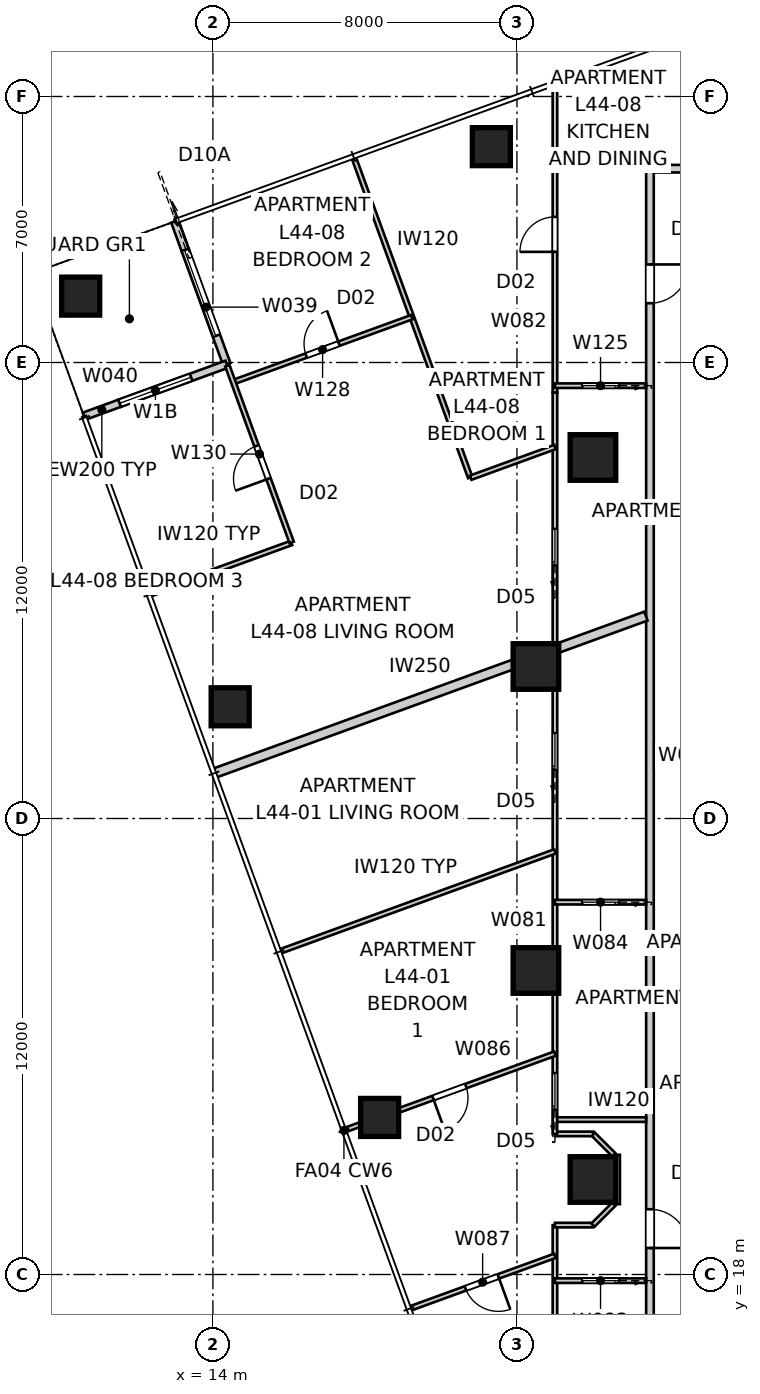
"""IFC4 building model, lengths in metres.
Left out: names, types, materials, properties, quantities, classifications, styles, units other than length and angle.
Written with IfcOpenShell. Run it as: python <this file> out.ifc"""

import sys

from ifc_helpers import new_model, si_unit, direction, frame, frame_2d, origin, origin_2d, place, context, subcontext, project, spatial, rectangle, extrude, element, fill, save


model = new_model("IFC4")
c1 = context("Model", 3, precision=1e-05, world=origin(), true_north=direction((0.0, 1.0)))
c2 = subcontext(c1, "Body", "Model", "MODEL_VIEW")
j1 = project(units=[si_unit("LENGTHUNIT", "METRE"), si_unit("PLANEANGLEUNIT", "RADIAN")], contexts=[c1])
p1 = place(None, origin())
s1 = spatial("IfcSite", under=j1, at=p1, CompositionType="ELEMENT")
p2 = place(p1, origin())
s2 = spatial("IfcBuilding", under=s1, at=p2, CompositionType="ELEMENT")
p3 = place(p2, frame((0.0, 0.0, 160.8)))
s3 = spatial("IfcBuildingStorey", under=s2, at=p3, CompositionType="ELEMENT", Elevation=160.8)
for number, where, z_axis, x_axis in (
    (1, (21.327, 47.68, 0.0), (0.0, 0.0, 1.0), (1.0, 0.0, 0.0)),
    (2, (10.521, 43.747, 0.0), (0.0, 0.0, 1.0), (1.0, 0.0, 0.0)),
    (3, (14.454, 32.94, 0.0), (0.0, 0.0, 1.0), (1.0, 0.0, 0.0)),
    (4, (18.387, 22.134, 0.0), (0.0, 0.0, 1.0), (1.0, 0.0, 0.0)),
):
    element("IfcColumn", number, at=place(p3, frame(where, z_axis=z_axis, x_axis=x_axis)), inside=s3, PredefinedType="COLUMN", context=c2, shape_type="SweptSolid", body=[
        extrude(rectangle(XDim=1.0, YDim=1.0, at=origin_2d()), origin(), (0.0, 0.0, 1.0), 3.4),
    ])
for number, where, z_axis, x_axis in (
    (5, (24.0, 39.5, 0.0), (0.0, 0.0, 1.0), (1.0, 0.0, 0.0)),
    (6, (22.5, 34.0, 0.0), (0.0, 0.0, 1.0), (1.0, 0.0, 0.0)),
    (7, (22.5, 26.0, 0.0), (0.0, 0.0, 1.0), (1.0, 0.0, 0.0)),
    (8, (24.0, 20.5, 0.0), (0.0, 0.0, 1.0), (1.0, 0.0, 0.0)),
):
    element("IfcColumn", number, at=place(p3, frame(where, z_axis=z_axis, x_axis=x_axis)), inside=s3, PredefinedType="COLUMN", context=c2, shape_type="SweptSolid", body=[
        extrude(rectangle(XDim=1.2, YDim=1.2, at=origin_2d()), origin(), (0.0, 0.0, 1.0), 3.4),
    ])
p4 = place(p3, frame((12.998, 45.712, 0.0), z_axis=(0.0, 0.0, 1.0), x_axis=(0.342110593602, -0.939659694648, 0.0)))
e9 = element("IfcWall", 9, at=p4, inside=s3, PredefinedType="SOLIDWALL", context=c2, shape_type="SweptSolid", body=[
    extrude(rectangle(XDim=0.8, YDim=0.2, at=frame_2d((0.4, 0.0))), origin(), (0.0, 0.0, 1.0), 3.25),
])
p5 = place(p3, frame((13.271, 44.96, 0.0), z_axis=(0.0, 0.0, 1.0), x_axis=(0.342018703306, -0.939693144909, 0.0)))
e10 = element("IfcWall", 10, at=p5, inside=s3, PredefinedType="SOLIDWALL", context=c2, shape_type="SweptSolid", body=[
    extrude(rectangle(XDim=3.2, YDim=0.2, at=frame_2d((1.6, 0.0))), origin(), (0.0, 0.0, 1.0), 2.722),
])
p6 = place(p5, origin())
e11 = element("IfcOpeningElement", 11, at=p6, cuts=e10, PredefinedType="OPENING", context=c2, shape_type="SweptSolid", body=[
    extrude(rectangle(XDim=2.4, YDim=2.1, at=frame_2d((1.2, 1.05))), frame((0.0, 0.11, 0.0), z_axis=(0.0, -1.0, 0.0), x_axis=(1.0, 0.0, 0.0)), (0.0, 0.0, 1.0), 0.22),
])
p7 = place(p3, frame((14.366, 41.953, 0.0), z_axis=(0.0, 0.0, 1.0), x_axis=(-0.939712609717, -0.341965219194, 0.0)))
e12 = element("IfcWall", 12, at=p7, inside=s3, PredefinedType="SOLIDWALL", context=c2, shape_type="SweptSolid", body=[
    extrude(rectangle(XDim=3.0, YDim=0.2, at=frame_2d((1.5, 0.0))), origin(), (0.0, 0.0, 1.0), 2.722),
])
p8 = place(p7, frame((1.0, 0.0, 0.45)))
e13 = element("IfcOpeningElement", 13, at=p8, cuts=e12, PredefinedType="OPENING", context=c2, shape_type="SweptSolid", body=[
    extrude(rectangle(XDim=2.0, YDim=1.8, at=frame_2d((1.0, 0.9))), frame((0.0, 0.11, 0.0), z_axis=(0.0, -1.0, 0.0), x_axis=(1.0, 0.0, 0.0)), (0.0, 0.0, 1.0), 0.22),
])
p9 = place(p3, frame((11.547, 40.927, 0.0), z_axis=(0.0, 0.0, 1.0), x_axis=(-0.939686455819, -0.342037080957, 0.0)))
e14 = element("IfcWall", 14, at=p9, inside=s3, PredefinedType="SOLIDWALL", context=c2, shape_type="SweptSolid", body=[
    extrude(rectangle(XDim=1.0, YDim=0.2, at=frame_2d((0.5, 0.0))), origin(), (0.0, 0.0, 1.0), 3.25),
])
p10 = place(p3, frame((33.098, 47.1, 0.0), z_axis=(0.0, 0.0, 1.0), x_axis=(-1.0, 0.0, 0.0)))
e15 = element("IfcWall", 15, at=p10, inside=s3, PredefinedType="PARTITIONING", context=c2, shape_type="SweptSolid", body=[
    extrude(rectangle(XDim=7.598, YDim=0.2, at=frame_2d((3.799, 0.0))), origin(), (0.0, 0.0, 1.0), 3.25),
])
p11 = place(p3, frame((25.5, 47.1, 0.0), z_axis=(0.0, 0.0, 1.0), x_axis=(0.0, -1.0, 0.0)))
e16 = element("IfcWall", 16, at=p11, inside=s3, PredefinedType="PARTITIONING", context=c2, shape_type="SweptSolid", body=[
    extrude(rectangle(XDim=33.4, YDim=0.2, at=frame_2d((16.7, 0.0))), origin(), (0.0, 0.0, 1.0), 3.25),
])
p12 = place(p11, frame((2.52, 0.0, 0.0)))
e17 = element("IfcOpeningElement", 17, at=p12, cuts=e16, PredefinedType="OPENING", context=c2, shape_type="SweptSolid", body=[
    extrude(rectangle(XDim=1.02, YDim=2.34, at=frame_2d((0.51, 1.17))), frame((0.0, 0.11, 0.0), z_axis=(0.0, -1.0, 0.0), x_axis=(1.0, 0.0, 0.0)), (0.0, 0.0, 1.0), 0.22),
])
p13 = place(p11, frame((27.383, 0.0, 0.0)))
e18 = element("IfcOpeningElement", 18, at=p13, cuts=e16, PredefinedType="OPENING", context=c2, shape_type="SweptSolid", body=[
    extrude(rectangle(XDim=1.02, YDim=2.1, at=frame_2d((0.51, 1.05))), frame((0.0, 0.11, 0.0), z_axis=(0.0, -1.0, 0.0), x_axis=(1.0, 0.0, 0.0)), (0.0, 0.0, 1.0), 0.22),
])
p14 = place(p3, frame((14.027, 31.188, 0.0), z_axis=(0.0, 0.0, 1.0), x_axis=(0.939693801585, 0.342016899091, 0.0)))
e19 = element("IfcWall", 19, at=p14, inside=s3, PredefinedType="PARTITIONING", context=c2, shape_type="SweptSolid", body=[
    extrude(rectangle(XDim=12.097, YDim=0.25, at=frame_2d((6.049, 0.0))), origin(), (0.0, 0.0, 1.0), 3.25),
])
p15 = place(p3, frame((23.0, 22.076, 0.0), z_axis=(0.0, 0.0, 1.0), x_axis=(1.0, 0.0, 0.0)))
e20 = element("IfcWall", 20, at=p15, inside=s3, PredefinedType="PARTITIONING", context=c2, shape_type="SweptSolid", body=[
    extrude(rectangle(XDim=2.4, YDim=0.12, at=frame_2d((1.2, 0.0))), origin(), (0.0, 0.0, 1.0), 3.25),
])
p16 = place(p3, frame((23.0, 11.2, 0.0), z_axis=(0.0, 0.0, 1.0), x_axis=(0.0, 1.0, 0.0)))
e21 = element("IfcWall", 21, at=p16, inside=s3, PredefinedType="PARTITIONING", context=c2, shape_type="SweptSolid", body=[
    extrude(rectangle(XDim=8.1, YDim=0.12, at=frame_2d((4.05, 0.0))), origin(), (0.0, 0.0, 1.0), 3.25),
])
p17 = place(p16, frame((3.849, 0.0, 0.0)))
e22 = element("IfcOpeningElement", 22, at=p17, cuts=e21, PredefinedType="OPENING", context=c2, shape_type="SweptSolid", body=[
    extrude(rectangle(XDim=0.96, YDim=2.1, at=frame_2d((0.48, 1.05))), frame((0.0, 0.07, 0.0), z_axis=(0.0, -1.0, 0.0), x_axis=(1.0, 0.0, 0.0)), (0.0, 0.0, 1.0), 0.14),
])
p18 = place(p3, frame((23.0, 19.3, 0.0), z_axis=(0.0, 0.0, 1.0), x_axis=(1.0, 0.0, 0.0)))
e23 = element("IfcWall", 23, at=p18, inside=s3, PredefinedType="PARTITIONING", context=c2, shape_type="SweptSolid", body=[
    extrude(rectangle(XDim=1.0, YDim=0.12, at=frame_2d((0.5, 0.0))), origin(), (0.0, 0.0, 1.0), 3.25),
])
p19 = place(p3, frame((24.0, 19.3, 0.0), z_axis=(0.0, 0.0, 1.0), x_axis=(0.707106781187, 0.707106781187, 0.0)))
e24 = element("IfcWall", 24, at=p19, inside=s3, PredefinedType="PARTITIONING", context=c2, shape_type="SweptSolid", body=[
    extrude(rectangle(XDim=0.778, YDim=0.12, at=frame_2d((0.389, 0.0))), origin(), (0.0, 0.0, 1.0), 3.25),
])
p20 = place(p3, frame((24.65, 19.85, 0.0), z_axis=(0.0, 0.0, 1.0), x_axis=(0.0, 1.0, 0.0)))
e25 = element("IfcWall", 25, at=p20, inside=s3, PredefinedType="PARTITIONING", context=c2, shape_type="SweptSolid", body=[
    extrude(rectangle(XDim=1.3, YDim=0.12, at=frame_2d((0.65, 0.0))), origin(), (0.0, 0.0, 1.0), 3.25),
])
p21 = place(p3, frame((24.55, 21.15, 0.0), z_axis=(0.0, 0.0, 1.0), x_axis=(-0.707106781187, 0.707106781187, 0.0)))
e26 = element("IfcWall", 26, at=p21, inside=s3, PredefinedType="PARTITIONING", context=c2, shape_type="SweptSolid", body=[
    extrude(rectangle(XDim=0.778, YDim=0.12, at=frame_2d((0.389, 0.0))), origin(), (0.0, 0.0, 1.0), 3.25),
])
p22 = place(p3, frame((24.0, 21.7, 0.0), z_axis=(0.0, 0.0, 1.0), x_axis=(-1.0, 0.0, 0.0)))
e27 = element("IfcWall", 27, at=p22, inside=s3, PredefinedType="PARTITIONING", context=c2, shape_type="SweptSolid", body=[
    extrude(rectangle(XDim=1.0, YDim=0.12, at=frame_2d((0.5, 0.0))), origin(), (0.0, 0.0, 1.0), 3.25),
])
p23 = place(p3, frame((23.0, 21.7, 0.0), z_axis=(0.0, 0.0, 1.0), x_axis=(0.0, 1.0, 0.0)))
e28 = element("IfcWall", 28, at=p23, inside=s3, PredefinedType="PARTITIONING", context=c2, shape_type="SweptSolid", body=[
    extrude(rectangle(XDim=19.512, YDim=0.12, at=frame_2d((9.756, 0.0))), origin(), (0.0, 0.0, 1.0), 2.55),
])
p24 = place(p23, frame((14.961, 0.0, 0.0)))
e29 = element("IfcOpeningElement", 29, at=p24, cuts=e28, PredefinedType="OPENING", context=c2, shape_type="SweptSolid", body=[
    extrude(rectangle(XDim=0.96, YDim=2.1, at=frame_2d((0.48, 1.05))), frame((0.0, 0.07, 0.0), z_axis=(0.0, -1.0, 0.0), x_axis=(1.0, 0.0, 0.0)), (0.0, 0.0, 1.0), 0.14),
])
p25 = place(p23, frame((0.641, 0.0, 0.0)))
e30 = element("IfcOpeningElement", 30, at=p25, cuts=e28, PredefinedType="OPENING", context=c2, shape_type="SweptSolid", body=[
    extrude(rectangle(XDim=0.96, YDim=2.1, at=frame_2d((0.48, 1.05))), frame((0.0, 0.07, 0.0), z_axis=(0.0, -1.0, 0.0), x_axis=(1.0, 0.0, 0.0)), (0.0, 0.0, 1.0), 0.14),
])
p26 = place(p23, frame((9.587, 0.0, 0.0)))
e31 = element("IfcOpeningElement", 31, at=p26, cuts=e28, PredefinedType="OPENING", context=c2, shape_type="SweptSolid", body=[
    extrude(rectangle(XDim=0.96, YDim=2.1, at=frame_2d((0.48, 1.05))), frame((0.0, 0.07, 0.0), z_axis=(0.0, -1.0, 0.0), x_axis=(1.0, 0.0, 0.0)), (0.0, 0.0, 1.0), 0.14),
])
p27 = place(p3, frame((25.4, 17.838, 0.0), z_axis=(0.0, 0.0, 1.0), x_axis=(-1.0, 0.0, 0.0)))
e32 = element("IfcWall", 32, at=p27, inside=s3, PredefinedType="PARTITIONING", context=c2, shape_type="SweptSolid", body=[
    extrude(rectangle(XDim=2.4, YDim=0.12, at=frame_2d((1.2, 0.0))), origin(), (0.0, 0.0, 1.0), 3.25),
])
p28 = place(p27, frame((0.72, 0.0, 0.0)))
e33 = element("IfcOpeningElement", 33, at=p28, cuts=e32, PredefinedType="OPENING", context=c2, shape_type="SweptSolid", body=[
    extrude(rectangle(XDim=0.96, YDim=2.1, at=frame_2d((0.48, 1.05))), frame((0.0, 0.07, 0.0), z_axis=(0.0, -1.0, 0.0), x_axis=(1.0, 0.0, 0.0)), (0.0, 0.0, 1.0), 0.14),
])
p29 = place(p3, frame((25.4, 27.798, 0.0), z_axis=(0.0, 0.0, 1.0), x_axis=(-1.0, 0.0, 0.0)))
e34 = element("IfcWall", 34, at=p29, inside=s3, PredefinedType="PARTITIONING", context=c2, shape_type="SweptSolid", body=[
    extrude(rectangle(XDim=2.4, YDim=0.12, at=frame_2d((1.2, 0.0))), origin(), (0.0, 0.0, 1.0), 3.25),
])
p30 = place(p29, frame((0.72, 0.0, 0.0)))
e35 = element("IfcOpeningElement", 35, at=p30, cuts=e34, PredefinedType="OPENING", context=c2, shape_type="SweptSolid", body=[
    extrude(rectangle(XDim=0.96, YDim=2.1, at=frame_2d((0.48, 1.05))), frame((0.0, 0.07, 0.0), z_axis=(0.0, -1.0, 0.0), x_axis=(1.0, 0.0, 0.0)), (0.0, 0.0, 1.0), 0.14),
])
p31 = place(p3, frame((23.0, 29.134, 0.0), z_axis=(0.0, 0.0, 1.0), x_axis=(-0.939685835373, -0.342038785519, 0.0)))
e36 = element("IfcWall", 36, at=p31, inside=s3, PredefinedType="PARTITIONING", context=c2, shape_type="SweptSolid", body=[
    extrude(rectangle(XDim=7.689, YDim=0.12, at=frame_2d((3.844, 0.0))), origin(), (0.0, 0.0, 1.0), 3.25),
])
p32 = place(p3, frame((23.0, 23.812, 0.0), z_axis=(0.0, 0.0, 1.0), x_axis=(-0.939693791822, -0.342016925912, 0.0)))
e37 = element("IfcWall", 37, at=p32, inside=s3, PredefinedType="PARTITIONING", context=c2, shape_type="SweptSolid", body=[
    extrude(rectangle(XDim=5.869, YDim=0.12, at=frame_2d((2.935, 0.0))), origin(), (0.0, 0.0, 1.0), 3.25),
])
p33 = place(p32, frame((2.494, 0.0, 0.0)))
e38 = element("IfcOpeningElement", 38, at=p33, cuts=e37, PredefinedType="OPENING", context=c2, shape_type="SweptSolid", body=[
    extrude(rectangle(XDim=0.92, YDim=2.34, at=frame_2d((0.46, 1.17))), frame((0.0, 0.07, 0.0), z_axis=(0.0, -1.0, 0.0), x_axis=(1.0, 0.0, 0.0)), (0.0, 0.0, 1.0), 0.14),
])
p34 = place(p3, frame((23.0, 18.492, 0.0), z_axis=(0.0, 0.0, 1.0), x_axis=(-0.939682468191, -0.342048036063, 0.0)))
e39 = element("IfcWall", 39, at=p34, inside=s3, PredefinedType="PARTITIONING", context=c2, shape_type="SweptSolid", body=[
    extrude(rectangle(XDim=4.049, YDim=0.12, at=frame_2d((2.024, 0.0))), origin(), (0.0, 0.0, 1.0), 3.25),
])
p35 = place(p34, frame((1.584, 0.0, 0.0)))
e40 = element("IfcOpeningElement", 40, at=p35, cuts=e39, PredefinedType="OPENING", context=c2, shape_type="SweptSolid", body=[
    extrude(rectangle(XDim=0.92, YDim=2.34, at=frame_2d((0.46, 1.17))), frame((0.0, 0.07, 0.0), z_axis=(0.0, -1.0, 0.0), x_axis=(1.0, 0.0, 0.0)), (0.0, 0.0, 1.0), 0.14),
])
p36 = place(p3, frame((25.4, 41.39, 0.0), z_axis=(0.0, 0.0, 1.0), x_axis=(-1.0, 0.0, 0.0)))
e41 = element("IfcWall", 41, at=p36, inside=s3, PredefinedType="PARTITIONING", context=c2, shape_type="SweptSolid", body=[
    extrude(rectangle(XDim=2.4, YDim=0.12, at=frame_2d((1.2, 0.0))), origin(), (0.0, 0.0, 1.0), 3.25),
])
p37 = place(p36, frame((0.72, 0.0, 0.0)))
e42 = element("IfcOpeningElement", 42, at=p37, cuts=e41, PredefinedType="OPENING", context=c2, shape_type="SweptSolid", body=[
    extrude(rectangle(XDim=0.96, YDim=2.1, at=frame_2d((0.48, 1.05))), frame((0.0, 0.07, 0.0), z_axis=(0.0, -1.0, 0.0), x_axis=(1.0, 0.0, 0.0)), (0.0, 0.0, 1.0), 0.14),
])
p38 = place(p3, frame((17.71, 47.385, 0.0), z_axis=(0.0, 0.0, 1.0), x_axis=(0.342034340019, -0.939687453491, 0.0)))
e43 = element("IfcWall", 43, at=p38, inside=s3, PredefinedType="PARTITIONING", context=c2, shape_type="SweptSolid", body=[
    extrude(rectangle(XDim=8.95, YDim=0.12, at=frame_2d((4.475, 0.0))), origin(), (0.0, 0.0, 1.0), 3.25),
])
p39 = place(p3, frame((20.784, 38.969, 0.0), z_axis=(0.0, 0.0, 1.0), x_axis=(0.939696672396, 0.342009011412, 0.0)))
e44 = element("IfcWall", 44, at=p39, inside=s3, PredefinedType="PARTITIONING", context=c2, shape_type="SweptSolid", body=[
    extrude(rectangle(XDim=2.359, YDim=0.12, at=frame_2d((1.179, 0.0))), origin(), (0.0, 0.0, 1.0), 3.25),
])
p40 = place(p3, frame((14.537, 41.484, 0.0), z_axis=(0.0, 0.0, 1.0), x_axis=(0.939696437289, 0.342009657388, 0.0)))
e45 = element("IfcWall", 45, at=p40, inside=s3, PredefinedType="PARTITIONING", context=c2, shape_type="SweptSolid", body=[
    extrude(rectangle(XDim=5.0, YDim=0.12, at=frame_2d((2.5, 0.0))), origin(), (0.0, 0.0, 1.0), 3.25),
])
p41 = place(p40, frame((2.04, 0.0, 0.0)))
e46 = element("IfcOpeningElement", 46, at=p41, cuts=e45, PredefinedType="OPENING", context=c2, shape_type="SweptSolid", body=[
    extrude(rectangle(XDim=0.92, YDim=2.34, at=frame_2d((0.46, 1.17))), frame((0.0, 0.07, 0.0), z_axis=(0.0, -1.0, 0.0), x_axis=(1.0, 0.0, 0.0)), (0.0, 0.0, 1.0), 0.14),
])
p42 = place(p3, frame((12.355, 35.901, 0.0), z_axis=(0.0, 0.0, 1.0), x_axis=(0.939701350773, 0.341996156931, 0.0)))
e47 = element("IfcWall", 47, at=p42, inside=s3, PredefinedType="PARTITIONING", context=c2, shape_type="SweptSolid", body=[
    extrude(rectangle(XDim=3.95, YDim=0.12, at=frame_2d((1.975, 0.0))), origin(), (0.0, 0.0, 1.0), 3.25),
])
p43 = place(p3, frame((16.073, 37.264, 0.0), z_axis=(0.0, 0.0, 1.0), x_axis=(-0.34204797738, 0.939682489552, 0.0)))
e48 = element("IfcWall", 48, at=p43, inside=s3, PredefinedType="PARTITIONING", context=c2, shape_type="SweptSolid", body=[
    extrude(rectangle(XDim=4.95, YDim=0.12, at=frame_2d((2.475, 0.0))), origin(), (0.0, 0.0, 1.0), 3.25),
])
p44 = place(p43, frame((1.785, 0.0, 0.0)))
e49 = element("IfcOpeningElement", 49, at=p44, cuts=e48, PredefinedType="OPENING", context=c2, shape_type="SweptSolid", body=[
    extrude(rectangle(XDim=0.92, YDim=2.34, at=frame_2d((0.46, 1.17))), frame((0.0, 0.07, 0.0), z_axis=(0.0, -1.0, 0.0), x_axis=(1.0, 0.0, 0.0)), (0.0, 0.0, 1.0), 0.14),
])
p45 = place(p3, frame((23.0, 41.212, 0.0), z_axis=(0.0, 0.0, 1.0), x_axis=(0.0, 1.0, 0.0)))
e50 = element("IfcWall", 50, at=p45, inside=s3, PredefinedType="PARTITIONING", context=c2, shape_type="SweptSolid", body=[
    extrude(rectangle(XDim=8.098, YDim=0.12, at=frame_2d((4.049, 0.0))), origin(), (0.0, 0.0, 1.0), 3.25),
])
p46 = place(p45, frame((3.699, 0.0, 0.0)))
e51 = element("IfcOpeningElement", 51, at=p46, cuts=e50, PredefinedType="OPENING", context=c2, shape_type="SweptSolid", body=[
    extrude(rectangle(XDim=0.92, YDim=2.34, at=frame_2d((0.46, 1.17))), frame((0.0, 0.07, 0.0), z_axis=(0.0, -1.0, 0.0), x_axis=(1.0, 0.0, 0.0)), (0.0, 0.0, 1.0), 0.14),
])
p47 = place(p6, origin())
e52 = element("IfcDoor", 52, at=p47, inside=s3, OperationType="SLIDING_TO_LEFT", PredefinedType="DOOR", context=c2, shape_type="SweptSolid", body=[
    extrude(rectangle(XDim=2.4, YDim=2.1, at=frame_2d((1.2, 1.05))), frame((0.0, 0.025, 0.0), z_axis=(0.0, -1.0, 0.0), x_axis=(1.0, 0.0, 0.0)), (0.0, 0.0, 1.0), 0.05),
])
fill(e11, e52)
p48 = place(p8, origin())
e53 = element("IfcWindow", 53, at=p48, inside=s3, PartitioningType="SINGLE_PANEL", PredefinedType="WINDOW", context=c2, shape_type="SweptSolid", body=[
    extrude(rectangle(XDim=2.0, YDim=1.8, at=frame_2d((1.0, 0.9))), frame((0.0, 0.03, 0.0), z_axis=(0.0, -1.0, 0.0), x_axis=(1.0, 0.0, 0.0)), (0.0, 0.0, 1.0), 0.06),
])
fill(e13, e53)
p49 = place(p12, origin())
e54 = element("IfcDoor", 54, at=p49, inside=s3, OperationType="SINGLE_SWING_LEFT", PredefinedType="DOOR", context=c2, shape_type="SweptSolid", body=[
    extrude(rectangle(XDim=1.02, YDim=2.34, at=frame_2d((0.51, 1.17))), frame((0.0, 0.025, 0.0), z_axis=(0.0, -1.0, 0.0), x_axis=(1.0, 0.0, 0.0)), (0.0, 0.0, 1.0), 0.05),
])
fill(e17, e54)
p50 = place(p13, origin())
e55 = element("IfcDoor", 55, at=p50, inside=s3, OperationType="SINGLE_SWING_RIGHT", PredefinedType="DOOR", context=c2, shape_type="SweptSolid", body=[
    extrude(rectangle(XDim=1.02, YDim=2.1, at=frame_2d((0.51, 1.05))), frame((0.0, 0.025, 0.0), z_axis=(0.0, -1.0, 0.0), x_axis=(1.0, 0.0, 0.0)), (0.0, 0.0, 1.0), 0.05),
])
fill(e18, e55)
p51 = place(p46, origin())
e56 = element("IfcDoor", 56, at=p51, inside=s3, OperationType="SINGLE_SWING_LEFT", PredefinedType="DOOR", context=c2, shape_type="SweptSolid", body=[
    extrude(rectangle(XDim=0.92, YDim=2.34, at=frame_2d((0.46, 1.17))), frame((0.0, 0.025, 0.0), z_axis=(0.0, -1.0, 0.0), x_axis=(1.0, 0.0, 0.0)), (0.0, 0.0, 1.0), 0.05),
])
fill(e51, e56)
p52 = place(p37, origin())
e57 = element("IfcDoor", 57, at=p52, inside=s3, OperationType="SLIDING_TO_LEFT", PredefinedType="DOOR", context=c2, shape_type="SweptSolid", body=[
    extrude(rectangle(XDim=0.96, YDim=2.1, at=frame_2d((0.48, 1.05))), frame((0.0, 0.025, 0.0), z_axis=(0.0, -1.0, 0.0), x_axis=(1.0, 0.0, 0.0)), (0.0, 0.0, 1.0), 0.05),
])
fill(e42, e57)
p53 = place(p28, origin())
e58 = element("IfcDoor", 58, at=p53, inside=s3, OperationType="SLIDING_TO_LEFT", PredefinedType="DOOR", context=c2, shape_type="SweptSolid", body=[
    extrude(rectangle(XDim=0.96, YDim=2.1, at=frame_2d((0.48, 1.05))), frame((0.0, 0.025, 0.0), z_axis=(0.0, -1.0, 0.0), x_axis=(1.0, 0.0, 0.0)), (0.0, 0.0, 1.0), 0.05),
])
fill(e33, e58)
p54 = place(p24, origin())
e59 = element("IfcDoor", 59, at=p54, inside=s3, OperationType="SLIDING_TO_LEFT", PredefinedType="DOOR", context=c2, shape_type="SweptSolid", body=[
    extrude(rectangle(XDim=0.96, YDim=2.1, at=frame_2d((0.48, 1.05))), frame((0.0, 0.025, 0.0), z_axis=(0.0, -1.0, 0.0), x_axis=(1.0, 0.0, 0.0)), (0.0, 0.0, 1.0), 0.05),
])
fill(e29, e59)
p55 = place(p41, origin())
e60 = element("IfcDoor", 60, at=p55, inside=s3, OperationType="SINGLE_SWING_RIGHT", PredefinedType="DOOR", context=c2, shape_type="SweptSolid", body=[
    extrude(rectangle(XDim=0.92, YDim=2.34, at=frame_2d((0.46, 1.17))), frame((0.0, 0.025, 0.0), z_axis=(0.0, -1.0, 0.0), x_axis=(1.0, 0.0, 0.0)), (0.0, 0.0, 1.0), 0.05),
])
fill(e46, e60)
p56 = place(p44, origin())
e61 = element("IfcDoor", 61, at=p56, inside=s3, OperationType="SINGLE_SWING_LEFT", PredefinedType="DOOR", context=c2, shape_type="SweptSolid", body=[
    extrude(rectangle(XDim=0.92, YDim=2.34, at=frame_2d((0.46, 1.17))), frame((0.0, 0.025, 0.0), z_axis=(0.0, -1.0, 0.0), x_axis=(1.0, 0.0, 0.0)), (0.0, 0.0, 1.0), 0.05),
])
fill(e49, e61)
p57 = place(p35, origin())
e62 = element("IfcDoor", 62, at=p57, inside=s3, OperationType="SINGLE_SWING_LEFT", PredefinedType="DOOR", context=c2, shape_type="SweptSolid", body=[
    extrude(rectangle(XDim=0.92, YDim=2.34, at=frame_2d((0.46, 1.17))), frame((0.0, 0.025, 0.0), z_axis=(0.0, -1.0, 0.0), x_axis=(1.0, 0.0, 0.0)), (0.0, 0.0, 1.0), 0.05),
])
fill(e40, e62)
p58 = place(p33, origin())
e63 = element("IfcDoor", 63, at=p58, inside=s3, OperationType="SINGLE_SWING_RIGHT", PredefinedType="DOOR", context=c2, shape_type="SweptSolid", body=[
    extrude(rectangle(XDim=0.92, YDim=2.34, at=frame_2d((0.46, 1.17))), frame((0.0, 0.025, 0.0), z_axis=(0.0, -1.0, 0.0), x_axis=(1.0, 0.0, 0.0)), (0.0, 0.0, 1.0), 0.05),
])
fill(e38, e63)
p59 = place(p25, origin())
e64 = element("IfcDoor", 64, at=p59, inside=s3, OperationType="SLIDING_TO_LEFT", PredefinedType="DOOR", context=c2, shape_type="SweptSolid", body=[
    extrude(rectangle(XDim=0.96, YDim=2.1, at=frame_2d((0.48, 1.05))), frame((0.0, 0.025, 0.0), z_axis=(0.0, -1.0, 0.0), x_axis=(1.0, 0.0, 0.0)), (0.0, 0.0, 1.0), 0.05),
])
fill(e30, e64)
p60 = place(p30, origin())
e65 = element("IfcDoor", 65, at=p60, inside=s3, OperationType="SLIDING_TO_LEFT", PredefinedType="DOOR", context=c2, shape_type="SweptSolid", body=[
    extrude(rectangle(XDim=0.96, YDim=2.1, at=frame_2d((0.48, 1.05))), frame((0.0, 0.025, 0.0), z_axis=(0.0, -1.0, 0.0), x_axis=(1.0, 0.0, 0.0)), (0.0, 0.0, 1.0), 0.05),
])
fill(e35, e65)
p61 = place(p26, origin())
e66 = element("IfcDoor", 66, at=p61, inside=s3, OperationType="SLIDING_TO_LEFT", PredefinedType="DOOR", context=c2, shape_type="SweptSolid", body=[
    extrude(rectangle(XDim=0.96, YDim=2.1, at=frame_2d((0.48, 1.05))), frame((0.0, 0.025, 0.0), z_axis=(0.0, -1.0, 0.0), x_axis=(1.0, 0.0, 0.0)), (0.0, 0.0, 1.0), 0.05),
])
fill(e31, e66)
save(model, sys.argv[1])
